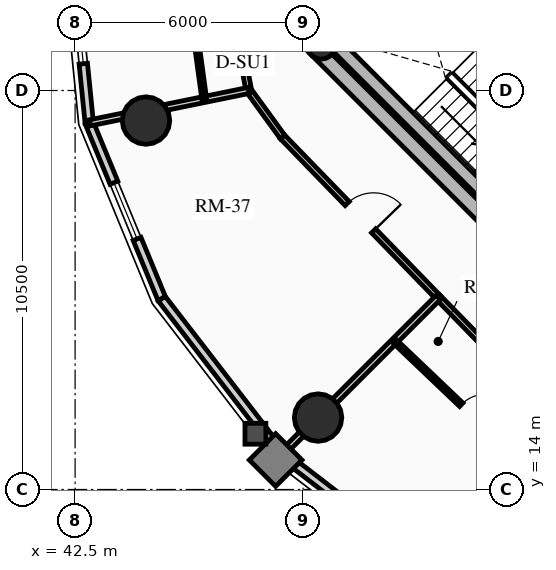
"""IFC4 building model, lengths in metres.
Left out: names, types, materials, properties, quantities, classifications, styles, units other than length and angle.
Written with IfcOpenShell. Run it as: python <this file> out.ifc"""

import sys

from ifc_helpers import new_model, si_unit, direction, frame, frame_2d, origin, origin_2d, place, context, subcontext, project, spatial, rectangle, circle, hollow_circle, extrude, source, transform, mapped, element, fill, save


model = new_model("IFC4")
c1 = context("Model", 3, precision=1e-05, world=origin(), true_north=direction((0.0, 1.0)))
c2 = subcontext(c1, "Body", "Model", "MODEL_VIEW")
j1 = project(units=[si_unit("LENGTHUNIT", "METRE"), si_unit("PLANEANGLEUNIT", "RADIAN")], contexts=[c1])
p1 = place(None, origin())
s1 = spatial("IfcSite", under=j1, at=p1, CompositionType="ELEMENT")
p2 = place(p1, origin())
s2 = spatial("IfcBuilding", under=s1, at=p2, CompositionType="ELEMENT")
p3 = place(p2, frame((0.0, 0.0, 169.06)))
s3 = spatial("IfcBuildingStorey", under=s2, at=p3, CompositionType="ELEMENT", Elevation=169.06)
p4 = place(p3, frame((58.702, 15.732, 0.0), z_axis=(0.0, 0.0, 1.0), x_axis=(-0.707106781187, 0.707106781187, 0.0)))
e1 = element("IfcWall", 1, at=p4, inside=s3, PredefinedType="SHEAR", context=c2, shape_type="SweptSolid", body=[
    extrude(rectangle(XDim=14.1, YDim=0.4, at=frame_2d((7.05, 0.0))), origin(), (0.0, 0.0, 1.0), 2.91),
])
p5 = place(p3, frame((48.873, 25.561, 0.0), z_axis=(0.0, 0.0, 1.0), x_axis=(0.707106781187, 0.707106781187, 0.0)))
e2 = element("IfcWall", 2, at=p5, inside=s3, PredefinedType="SHEAR", context=c2, shape_type="SweptSolid", body=[
    extrude(rectangle(XDim=10.7, YDim=0.4, at=frame_2d((5.35, 0.0))), origin(), (0.0, 0.0, 1.0), 2.91),
])
m1 = source(origin(), c2, "Body", "SweptSolid", [
    extrude(rectangle(XDim=1.5, YDim=2.02, at=frame_2d((0.75, 1.01))), frame((0.0, 0.21, 0.0), z_axis=(0.0, -1.0, 0.0), x_axis=(1.0, 0.0, 0.0)), (0.0, 0.0, 1.0), 0.42),
])
p6 = place(p5, frame((4.6, 0.0, 0.0)))
e3 = element("IfcOpeningElement", 3, at=p6, cuts=e2, PredefinedType="OPENING", context=c2, shape_type="MappedRepresentation", body=[
    mapped(m1, transform((0.0, 0.0, 0.0), x_axis=(1.0, 0.0, 0.0), y_axis=(0.0, 1.0, 0.0), z_axis=(0.0, 0.0, 1.0), scale=1.0)),
])
p7 = place(p3, frame((61.06, 18.373, 0.0), z_axis=(0.0, 0.0, 1.0), x_axis=(-0.707106781187, 0.707106781187, 0.0)))
e4 = element("IfcWall", 4, at=p7, inside=s3, PredefinedType="SHEAR", context=c2, shape_type="SweptSolid", body=[
    extrude(rectangle(XDim=13.7, YDim=0.35, at=frame_2d((6.85, 0.0))), origin(), (0.0, 0.0, 1.0), 2.91),
])
m2 = source(origin(), c2, "Body", "SweptSolid", [
    extrude(rectangle(XDim=1.1, YDim=2.015, at=frame_2d((0.55, 1.007))), frame((0.0, 0.185, 0.0), z_axis=(0.0, -1.0, 0.0), x_axis=(1.0, 0.0, 0.0)), (0.0, 0.0, 1.0), 0.37),
])
p8 = place(p7, frame((4.85, 0.0, 0.0)))
e5 = element("IfcOpeningElement", 5, at=p8, cuts=e4, PredefinedType="OPENING", context=c2, shape_type="MappedRepresentation", body=[
    mapped(m2, transform((0.0, 0.0, 0.0), x_axis=(1.0, 0.0, 0.0), y_axis=(0.0, 1.0, 0.0), z_axis=(0.0, 0.0, 1.0), scale=1.0)),
])
p9 = place(p7, frame((0.625, 0.0, 0.0)))
e6 = element("IfcOpeningElement", 6, at=p9, cuts=e4, PredefinedType="OPENING", context=c2, shape_type="MappedRepresentation", body=[
    mapped(m2, transform((0.0, 0.0, 0.0), x_axis=(1.0, 0.0, 0.0), y_axis=(0.0, 1.0, 0.0), z_axis=(0.0, 0.0, 1.0), scale=1.0)),
])
p10 = place(p7, frame((2.625, 0.0, 0.0)))
e7 = element("IfcOpeningElement", 7, at=p10, cuts=e4, PredefinedType="OPENING", context=c2, shape_type="MappedRepresentation", body=[
    mapped(m2, transform((0.0, 0.0, 0.0), x_axis=(1.0, 0.0, 0.0), y_axis=(0.0, 1.0, 0.0), z_axis=(0.0, 0.0, 1.0), scale=1.0)),
])
m3 = source(origin(), c2, "Body", "SweptSolid", [
    extrude(rectangle(XDim=1.15, YDim=2.02, at=frame_2d((0.575, 1.01))), frame((0.0, 0.185, 0.0), z_axis=(0.0, -1.0, 0.0), x_axis=(1.0, 0.0, 0.0)), (0.0, 0.0, 1.0), 0.37),
])
p11 = place(p7, frame((7.27, 0.0, 0.0)))
e8 = element("IfcOpeningElement", 8, at=p11, cuts=e4, PredefinedType="OPENING", context=c2, shape_type="MappedRepresentation", body=[
    mapped(m3, transform((0.0, 0.0, 0.0), x_axis=(1.0, 0.0, 0.0), y_axis=(0.0, 1.0, 0.0), z_axis=(0.0, 0.0, 1.0), scale=1.0)),
])
p12 = place(p3, frame((53.922, 21.141, 0.0), z_axis=(0.0, 0.0, 1.0), x_axis=(-0.707106781187, 0.707106781187, 0.0)))
e9 = element("IfcWall", 9, at=p12, inside=s3, PredefinedType="SHEAR", context=c2, shape_type="SweptSolid", body=[
    extrude(rectangle(XDim=6.695, YDim=0.35, at=frame_2d((3.348, 0.0))), origin(), (0.0, 0.0, 1.0), 2.91),
])
p13 = place(p3, frame((48.976, 25.706, 0.0), z_axis=(0.0, 0.0, 1.0), x_axis=(0.707106781187, 0.707106781187, 0.0)))
e10 = element("IfcColumn", 10, at=p13, inside=s3, PredefinedType="COLUMN", context=c2, shape_type="SweptSolid", body=[
    extrude(hollow_circle(Radius=0.38, WallThickness=0.032, at=origin_2d()), origin(), (0.0, 0.0, 1.0), 2.91),
])
for number, where, z_axis, x_axis in (
    (11, (44.365, 23.709, 0.0), (0.0, 0.0, 1.0), (1.0, 0.0, 0.0)),
    (12, (48.893, 15.893, 0.0), (0.0, 0.0, 1.0), (1.0, 0.0, 0.0)),
):
    element("IfcColumn", number, at=place(p3, frame(where, z_axis=z_axis, x_axis=x_axis)), inside=s3, PredefinedType="USERDEFINED", context=c2, shape_type="SweptSolid", body=[
        extrude(circle(Radius=0.625, at=origin_2d()), origin(), (0.0, 0.0, 1.0), 2.91),
    ])
p14 = place(p3, frame((42.873, 23.646, 0.0), z_axis=(0.0, 0.0, 1.0), x_axis=(-0.100438356004, 0.994943283129, 0.0)))
e13 = element("IfcWall", 13, at=p14, inside=s3, PredefinedType="SOLIDWALL", context=c2, shape_type="SweptSolid", body=[
    extrude(rectangle(XDim=4.733, YDim=0.22, at=frame_2d((2.366, 0.0))), origin(), (0.0, 0.0, 1.0), 2.245),
])
m4 = source(origin(), c2, "Body", "SweptSolid", [
    extrude(rectangle(XDim=1.6, YDim=1.3, at=frame_2d((0.8, 0.65))), frame((0.0, 0.12, 0.0), z_axis=(0.0, -1.0, 0.0), x_axis=(1.0, 0.0, 0.0)), (0.0, 0.0, 1.0), 0.24),
])
p15 = place(p14, frame((1.566, 0.0, 0.65)))
e14 = element("IfcOpeningElement", 14, at=p15, cuts=e13, PredefinedType="OPENING", context=c2, shape_type="MappedRepresentation", body=[
    mapped(m4, transform((0.0, 0.0, 0.0), x_axis=(1.0, 0.0, 0.0), y_axis=(0.0, 1.0, 0.0), z_axis=(0.0, 0.0, 1.0), scale=1.0)),
])
p16 = place(p3, frame((44.78, 19.021, 0.0), z_axis=(0.0, 0.0, 1.0), x_axis=(-0.381196434348, 0.924494066201, 0.0)))
e15 = element("IfcWall", 15, at=p16, inside=s3, PredefinedType="SOLIDWALL", context=c2, shape_type="SweptSolid", body=[
    extrude(rectangle(XDim=5.003, YDim=0.22, at=frame_2d((2.501, 0.0))), origin(), (0.0, 0.0, 1.0), 2.245),
])
p17 = place(p16, frame((1.702, 0.0, 0.65)))
e16 = element("IfcOpeningElement", 16, at=p17, cuts=e15, PredefinedType="OPENING", context=c2, shape_type="MappedRepresentation", body=[
    mapped(m4, transform((0.0, 0.0, 0.0), x_axis=(1.0, 0.0, 0.0), y_axis=(0.0, 1.0, 0.0), z_axis=(0.0, 0.0, 1.0), scale=1.0)),
])
p18 = place(p3, frame((47.932, 14.932, 0.0), z_axis=(0.0, 0.0, 1.0), x_axis=(-0.610569654715, 0.791962560189, 0.0)))
e17 = element("IfcWall", 17, at=p18, inside=s3, PredefinedType="SOLIDWALL", context=c2, shape_type="SweptSolid", body=[
    extrude(rectangle(XDim=5.163, YDim=0.22, at=frame_2d((2.582, 0.0))), origin(), (0.0, 0.0, 1.0), 2.245),
])
p19 = place(p3, frame((52.021, 11.78, 0.0), z_axis=(0.0, 0.0, 1.0), x_axis=(-0.791962560189, 0.610569654715, 0.0)))
e18 = element("IfcWall", 18, at=p19, inside=s3, PredefinedType="SOLIDWALL", context=c2, shape_type="SweptSolid", body=[
    extrude(rectangle(XDim=5.163, YDim=0.22, at=frame_2d((2.582, 0.0))), origin(), (0.0, 0.0, 1.0), 2.245),
])
p20 = place(p19, frame((1.782, 0.0, 0.65)))
e19 = element("IfcOpeningElement", 19, at=p20, cuts=e18, PredefinedType="OPENING", context=c2, shape_type="MappedRepresentation", body=[
    mapped(m4, transform((0.0, 0.0, 0.0), x_axis=(1.0, 0.0, 0.0), y_axis=(0.0, 1.0, 0.0), z_axis=(0.0, 0.0, 1.0), scale=1.0)),
])
p21 = place(p3, frame((46.822, 25.836, 0.0), z_axis=(0.0, 0.0, 1.0), x_axis=(0.182115036249, -0.983277231289, 0.0)))
e20 = element("IfcWall", 20, at=p21, inside=s3, PredefinedType="PARTITIONING", context=c2, shape_type="SweptSolid", body=[
    extrude(rectangle(XDim=1.357, YDim=0.15, at=frame_2d((0.678, 0.0))), origin(), (0.0, 0.0, 1.0), 2.245),
])
p22 = place(p3, frame((47.069, 24.502, 0.0), z_axis=(0.0, 0.0, 1.0), x_axis=(0.587577436866, -0.809167940347, 0.0)))
e21 = element("IfcWall", 21, at=p22, inside=s3, PredefinedType="PARTITIONING", context=c2, shape_type="SweptSolid", body=[
    extrude(rectangle(XDim=1.515, YDim=0.15, at=frame_2d((0.757, 0.0))), origin(), (0.0, 0.0, 1.0), 2.245),
])
p23 = place(p3, frame((47.959, 23.277, 0.0), z_axis=(0.0, 0.0, 1.0), x_axis=(0.696422573496, -0.717631938479, 0.0)))
e22 = element("IfcWall", 22, at=p23, inside=s3, PredefinedType="PARTITIONING", context=c2, shape_type="SweptSolid", body=[
    extrude(rectangle(XDim=5.882, YDim=0.15, at=frame_2d((2.941, 0.0))), origin(), (0.0, 0.0, 1.0), 2.675),
])
m5 = source(origin(), c2, "Body", "SweptSolid", [
    extrude(rectangle(XDim=1.0, YDim=2.015, at=frame_2d((0.5, 1.007))), frame((0.0, 0.085, 0.0), z_axis=(0.0, -1.0, 0.0), x_axis=(1.0, 0.0, 0.0)), (0.0, 0.0, 1.0), 0.17),
])
p24 = place(p23, frame((2.441, 0.0, 0.0)))
e23 = element("IfcOpeningElement", 23, at=p24, cuts=e22, PredefinedType="OPENING", context=c2, shape_type="MappedRepresentation", body=[
    mapped(m5, transform((0.0, 0.0, 0.0), x_axis=(1.0, 0.0, 0.0), y_axis=(0.0, 1.0, 0.0), z_axis=(0.0, 0.0, 1.0), scale=1.0)),
])
p25 = place(p3, frame((52.055, 19.055, 0.0), z_axis=(0.0, 0.0, 1.0), x_axis=(0.699249850691, -0.714877364524, 0.0)))
e24 = element("IfcWall", 24, at=p25, inside=s3, PredefinedType="PARTITIONING", context=c2, shape_type="SweptSolid", body=[
    extrude(rectangle(XDim=5.999, YDim=0.15, at=frame_2d((3.0, 0.0))), origin(), (0.0, 0.0, 1.0), 2.245),
])
p26 = place(p3, frame((47.069, 24.502, 0.0), z_axis=(0.0, 0.0, 1.0), x_axis=(-0.979772902724, -0.200112616012, 0.0)))
e25 = element("IfcWall", 25, at=p26, inside=s3, PredefinedType="PARTITIONING", context=c2, shape_type="SweptSolid", body=[
    extrude(rectangle(XDim=4.263, YDim=0.16, at=frame_2d((2.131, 0.0))), origin(), (0.0, 0.0, 1.0), 2.245),
])
p27 = place(p3, frame((52.055, 19.055, 0.0), z_axis=(0.0, 0.0, 1.0), x_axis=(-0.707106781187, -0.707106781187, 0.0)))
e26 = element("IfcWall", 26, at=p27, inside=s3, PredefinedType="PARTITIONING", context=c2, shape_type="SweptSolid", body=[
    extrude(rectangle(XDim=5.811, YDim=0.16, at=frame_2d((2.906, 0.0))), origin(), (0.0, 0.0, 1.0), 2.245),
])
p28 = place(p3, frame((45.588, 26.541, 0.0), z_axis=(0.0, 0.0, 1.0), x_axis=(0.135321759641, -0.990801706381, 0.0)))
e27 = element("IfcWall", 27, at=p28, inside=s3, PredefinedType="PARTITIONING", context=c2, shape_type="SweptSolid", body=[
    extrude(rectangle(XDim=2.299, YDim=0.125, at=frame_2d((1.149, 0.0))), origin(), (0.0, 0.0, 1.0), 2.245),
])
p29 = place(p3, frame((50.905, 17.905, 0.0), z_axis=(0.0, 0.0, 1.0), x_axis=(0.723816902075, -0.689992095803, 0.0)))
e28 = element("IfcWall", 28, at=p29, inside=s3, PredefinedType="PARTITIONING", context=c2, shape_type="SweptSolid", body=[
    extrude(rectangle(XDim=5.753, YDim=0.125, at=frame_2d((2.876, 0.0))), origin(), (0.0, 0.0, 1.0), 2.245),
])
m6 = source(origin(), c2, "Body", "SweptSolid", [
    extrude(rectangle(XDim=0.9, YDim=2.005, at=frame_2d((0.45, 1.002))), frame((0.0, 0.073, 0.0), z_axis=(0.0, -1.0, 0.0), x_axis=(1.0, 0.0, 0.0)), (0.0, 0.0, 1.0), 0.145),
])
p30 = place(p29, frame((2.426, 0.0, 0.0)))
e29 = element("IfcOpeningElement", 29, at=p30, cuts=e28, PredefinedType="OPENING", context=c2, shape_type="MappedRepresentation", body=[
    mapped(m6, transform((0.0, 0.0, 0.0), x_axis=(1.0, 0.0, 0.0), y_axis=(0.0, 1.0, 0.0), z_axis=(0.0, 0.0, 1.0), scale=1.0)),
])
m7 = source(origin(), c2, "Body", "SweptSolid", [
    extrude(rectangle(XDim=1.6, YDim=1.3, at=frame_2d((0.8, 0.65))), frame((0.0, 0.03, 0.0), z_axis=(0.0, -1.0, 0.0), x_axis=(1.0, 0.0, 0.0)), (0.0, 0.0, 1.0), 0.06),
])
p31 = place(p15, origin())
e30 = element("IfcWindow", 30, at=p31, inside=s3, PartitioningType="SINGLE_PANEL", PredefinedType="WINDOW", context=c2, shape_type="MappedRepresentation", body=[
    mapped(m7, transform((0.0, 0.0, 0.0), x_axis=(1.0, 0.0, 0.0), y_axis=(0.0, 1.0, 0.0), z_axis=(0.0, 0.0, 1.0), scale=1.0)),
])
fill(e14, e30)
p32 = place(p17, origin())
e31 = element("IfcWindow", 31, at=p32, inside=s3, PartitioningType="SINGLE_PANEL", PredefinedType="WINDOW", context=c2, shape_type="MappedRepresentation", body=[
    mapped(m7, transform((0.0, 0.0, 0.0), x_axis=(1.0, 0.0, 0.0), y_axis=(0.0, 1.0, 0.0), z_axis=(0.0, 0.0, 1.0), scale=1.0)),
])
fill(e16, e31)
m8 = source(origin(), c2, "Body", "SweptSolid", [
    extrude(rectangle(XDim=1.0, YDim=2.015, at=frame_2d((0.5, 1.007))), frame((0.0, 0.025, 0.0), z_axis=(0.0, -1.0, 0.0), x_axis=(1.0, 0.0, 0.0)), (0.0, 0.0, 1.0), 0.05),
])
p33 = place(p24, origin())
e32 = element("IfcDoor", 32, at=p33, inside=s3, OperationType="SINGLE_SWING_RIGHT", PredefinedType="DOOR", context=c2, shape_type="MappedRepresentation", body=[
    mapped(m8, transform((0.0, 0.0, 0.0), x_axis=(1.0, 0.0, 0.0), y_axis=(0.0, 1.0, 0.0), z_axis=(0.0, 0.0, 1.0), scale=1.0)),
])
fill(e23, e32)
m9 = source(origin(), c2, "Body", "SweptSolid", [
    extrude(rectangle(XDim=0.9, YDim=2.005, at=frame_2d((0.45, 1.002))), frame((0.0, 0.025, 0.0), z_axis=(0.0, -1.0, 0.0), x_axis=(1.0, 0.0, 0.0)), (0.0, 0.0, 1.0), 0.05),
])
p34 = place(p30, origin())
e33 = element("IfcDoor", 33, at=p34, inside=s3, OperationType="SINGLE_SWING_RIGHT", PredefinedType="DOOR", context=c2, shape_type="MappedRepresentation", body=[
    mapped(m9, transform((0.0, 0.0, 0.0), x_axis=(1.0, 0.0, 0.0), y_axis=(0.0, 1.0, 0.0), z_axis=(0.0, 0.0, 1.0), scale=1.0)),
])
fill(e29, e33)
save(model, sys.argv[1])
